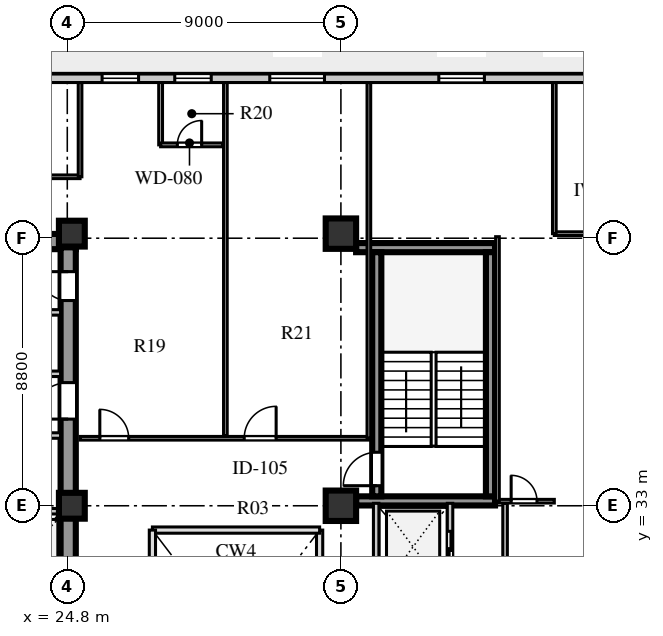
"""IFC4 building model, lengths in metres.
Left out: names, types, materials, properties, quantities, classifications, styles, units other than length and angle.
Written with IfcOpenShell. Run it as: python <this file> out.ifc"""

import sys

from ifc_helpers import new_model, si_unit, direction, frame, frame_2d, origin, origin_2d, place, context, subcontext, project, spatial, rectangle, extrude, element, fill, save


model = new_model("IFC4")
c1 = context("Model", 3, precision=1e-05, world=origin(), true_north=direction((0.0, 1.0)))
c2 = subcontext(c1, "Body", "Model", "MODEL_VIEW")
j1 = project(units=[si_unit("LENGTHUNIT", "METRE"), si_unit("PLANEANGLEUNIT", "RADIAN")], contexts=[c1])
p1 = place(None, origin())
s1 = spatial("IfcSite", under=j1, at=p1, CompositionType="ELEMENT")
p2 = place(p1, origin())
s2 = spatial("IfcBuilding", under=s1, at=p2, CompositionType="ELEMENT")
p3 = place(p2, frame((0.0, 0.0, 104.0)))
s3 = spatial("IfcBuildingStorey", under=s2, at=p3, CompositionType="ELEMENT", Elevation=104.0)
p4 = place(p3, frame((15.4, 41.69, 0.0), z_axis=(0.0, 0.0, 1.0), x_axis=(1.0, 0.0, 0.0)))
e1 = element("IfcWall", 1, at=p4, inside=s3, PredefinedType="SHEAR", context=c2, shape_type="SweptSolid", body=[
    extrude(rectangle(XDim=9.68, YDim=0.5, at=frame_2d((4.84, 0.0))), origin(), (0.0, 0.0, 1.0), 3.6),
])
p5 = place(p3, frame((24.83, 15.74, 0.0), z_axis=(0.0, 0.0, 1.0), x_axis=(0.0, 1.0, 0.0)))
e2 = element("IfcWall", 2, at=p5, inside=s3, PredefinedType="SHEAR", context=c2, shape_type="SweptSolid", body=[
    extrude(rectangle(XDim=25.76, YDim=0.5, at=frame_2d((12.88, 0.0))), origin(), (0.0, 0.0, 1.0), 3.6),
])
p6 = place(p5, frame((1.61, 0.0, 0.0)))
e3 = element("IfcOpeningElement", 3, at=p6, cuts=e2, PredefinedType="OPENING", context=c2, shape_type="SweptSolid", body=[
    extrude(rectangle(XDim=1.2, YDim=2.1, at=frame_2d((0.6, 1.05))), frame((0.0, 0.26, 0.0), z_axis=(0.0, -1.0, 0.0), x_axis=(1.0, 0.0, 0.0)), (0.0, 0.0, 1.0), 0.52),
])
p7 = place(p5, frame((6.78, 0.0, 0.0)))
e4 = element("IfcOpeningElement", 4, at=p7, cuts=e2, PredefinedType="OPENING", context=c2, shape_type="SweptSolid", body=[
    extrude(rectangle(XDim=0.85, YDim=2.06, at=frame_2d((0.425, 1.03))), frame((0.0, 0.26, 0.0), z_axis=(0.0, -1.0, 0.0), x_axis=(1.0, 0.0, 0.0)), (0.0, 0.0, 1.0), 0.52),
])
p8 = place(p5, frame((12.11, 0.0, 0.0)))
e5 = element("IfcOpeningElement", 5, at=p8, cuts=e2, PredefinedType="OPENING", context=c2, shape_type="SweptSolid", body=[
    extrude(rectangle(XDim=1.5, YDim=2.12, at=frame_2d((0.75, 1.06))), frame((0.0, 0.26, 0.0), z_axis=(0.0, -1.0, 0.0), x_axis=(1.0, 0.0, 0.0)), (0.0, 0.0, 1.0), 0.52),
])
p9 = place(p5, frame((20.11, 0.0, 0.0)))
e6 = element("IfcOpeningElement", 6, at=p9, cuts=e2, PredefinedType="OPENING", context=c2, shape_type="SweptSolid", body=[
    extrude(rectangle(XDim=1.2, YDim=2.12, at=frame_2d((0.6, 1.06))), frame((0.0, 0.26, 0.0), z_axis=(0.0, -1.0, 0.0), x_axis=(1.0, 0.0, 0.0)), (0.0, 0.0, 1.0), 0.52),
])
p10 = place(p5, frame((24.01, 0.0, 0.0)))
e7 = element("IfcOpeningElement", 7, at=p10, cuts=e2, PredefinedType="OPENING", context=c2, shape_type="SweptSolid", body=[
    extrude(rectangle(XDim=0.95, YDim=2.1, at=frame_2d((0.475, 1.05))), frame((0.0, 0.26, 0.0), z_axis=(0.0, -1.0, 0.0), x_axis=(1.0, 0.0, 0.0)), (0.0, 0.0, 1.0), 0.52),
])
for number, where, z_axis, x_axis in (
    (8, (34.3, 33.16, 0.0), (0.0, 0.0, 1.0), (1.0, 0.0, 0.0)),
    (9, (34.3, 41.49, 0.0), (0.0, 0.0, 1.0), (1.0, 0.0, 0.0)),
):
    element("IfcWall", number, at=place(p3, frame(where, z_axis=z_axis, x_axis=x_axis)), inside=s3, PredefinedType="SHEAR", context=c2, shape_type="SweptSolid", body=[
        extrude(rectangle(XDim=4.57, YDim=0.3, at=frame_2d((2.285, 0.0))), origin(), (0.0, 0.0, 1.0), 3.6),
    ])
p11 = place(p3, frame((34.98, 33.31, 0.0), z_axis=(0.0, 0.0, 1.0), x_axis=(0.0, 1.0, 0.0)))
e10 = element("IfcWall", 10, at=p11, inside=s3, PredefinedType="SHEAR", context=c2, shape_type="SweptSolid", body=[
    extrude(rectangle(XDim=8.03, YDim=0.3, at=frame_2d((4.015, 0.0))), origin(), (0.0, 0.0, 1.0), 3.6),
])
p12 = place(p11, frame((0.35, 0.0, 0.0)))
e11 = element("IfcOpeningElement", 11, at=p12, cuts=e10, PredefinedType="OPENING", context=c2, shape_type="SweptSolid", body=[
    extrude(rectangle(XDim=1.1, YDim=2.1, at=frame_2d((0.55, 1.05))), frame((0.0, 0.16, 0.0), z_axis=(0.0, -1.0, 0.0), x_axis=(1.0, 0.0, 0.0)), (0.0, 0.0, 1.0), 0.32),
])
p13 = place(p3, frame((38.72, 33.31, 0.0), z_axis=(0.0, 0.0, 1.0), x_axis=(0.0, 1.0, 0.0)))
e12 = element("IfcWall", 12, at=p13, inside=s3, PredefinedType="SHEAR", context=c2, shape_type="SweptSolid", body=[
    extrude(rectangle(XDim=8.03, YDim=0.3, at=frame_2d((4.015, 0.0))), origin(), (0.0, 0.0, 1.0), 3.6),
])
for number, where, z_axis, x_axis in (
    (13, (24.95, 33.0, 0.0), (0.0, 0.0, 1.0), (1.0, 0.0, 0.0)),
    (14, (24.95, 41.95, 0.0), (0.0, 0.0, 1.0), (1.0, 0.0, 0.0)),
):
    element("IfcColumn", number, at=place(p3, frame(where, z_axis=z_axis, x_axis=x_axis)), inside=s3, PredefinedType="COLUMN", context=c2, shape_type="SweptSolid", body=[
        extrude(rectangle(XDim=0.85, YDim=0.85, at=origin_2d()), origin(), (0.0, 0.0, 1.0), 3.6),
    ])
for number, where, z_axis, x_axis in (
    (15, (33.8, 33.0, 0.0), (0.0, 0.0, 1.0), (1.0, 0.0, 0.0)),
    (16, (33.8, 41.95, 0.0), (0.0, 0.0, 1.0), (1.0, 0.0, 0.0)),
):
    element("IfcColumn", number, at=place(p3, frame(where, z_axis=z_axis, x_axis=x_axis)), inside=s3, PredefinedType="COLUMN", context=c2, shape_type="SweptSolid", body=[
        extrude(rectangle(XDim=1.0, YDim=1.0, at=origin_2d()), origin(), (0.0, 0.0, 1.0), 3.6),
    ])
p14 = place(p3, frame((45.35, 47.06, 0.0), z_axis=(0.0, 0.0, 1.0), x_axis=(-1.0, 0.0, 0.0)))
e17 = element("IfcWall", 17, at=p14, inside=s3, PredefinedType="STANDARD", context=c2, shape_type="SweptSolid", body=[
    extrude(rectangle(XDim=32.1, YDim=0.28, at=frame_2d((16.05, 0.0))), origin(), (0.0, 0.0, 1.0), 3.6),
])
p15 = place(p14, frame((30.15, 0.0, 0.0)))
e18 = element("IfcOpeningElement", 18, at=p15, cuts=e17, PredefinedType="OPENING", context=c2, shape_type="SweptSolid", body=[
    extrude(rectangle(XDim=1.0, YDim=2.05, at=frame_2d((0.5, 1.025))), frame((0.0, 0.15, 0.0), z_axis=(0.0, -1.0, 0.0), x_axis=(1.0, 0.0, 0.0)), (0.0, 0.0, 1.0), 0.3),
])
p16 = place(p14, frame((24.345, 0.0, 0.8)))
e19 = element("IfcOpeningElement", 19, at=p16, cuts=e17, PredefinedType="OPENING", context=c2, shape_type="SweptSolid", body=[
    extrude(rectangle(XDim=1.65, YDim=1.95, at=frame_2d((0.825, 0.975))), frame((0.0, 0.15, 0.0), z_axis=(0.0, -1.0, 0.0), x_axis=(1.0, 0.0, 0.0)), (0.0, 0.0, 1.0), 0.3),
])
p17 = place(p14, frame((18.205, 0.0, 0.8)))
e20 = element("IfcOpeningElement", 20, at=p17, cuts=e17, PredefinedType="OPENING", context=c2, shape_type="SweptSolid", body=[
    extrude(rectangle(XDim=1.2, YDim=1.75, at=frame_2d((0.6, 0.875))), frame((0.0, 0.15, 0.0), z_axis=(0.0, -1.0, 0.0), x_axis=(1.0, 0.0, 0.0)), (0.0, 0.0, 1.0), 0.3),
])
p18 = place(p14, frame((15.815, 0.0, 0.8)))
e21 = element("IfcOpeningElement", 21, at=p18, cuts=e17, PredefinedType="OPENING", context=c2, shape_type="SweptSolid", body=[
    extrude(rectangle(XDim=1.2, YDim=1.75, at=frame_2d((0.6, 0.875))), frame((0.0, 0.15, 0.0), z_axis=(0.0, -1.0, 0.0), x_axis=(1.0, 0.0, 0.0)), (0.0, 0.0, 1.0), 0.3),
])
p19 = place(p14, frame((12.09, 0.0, 0.8)))
e22 = element("IfcOpeningElement", 22, at=p19, cuts=e17, PredefinedType="OPENING", context=c2, shape_type="SweptSolid", body=[
    extrude(rectangle(XDim=1.8, YDim=2.0, at=frame_2d((0.9, 1.0))), frame((0.0, 0.15, 0.0), z_axis=(0.0, -1.0, 0.0), x_axis=(1.0, 0.0, 0.0)), (0.0, 0.0, 1.0), 0.3),
])
p20 = place(p14, frame((6.83, 0.0, 0.8)))
e23 = element("IfcOpeningElement", 23, at=p20, cuts=e17, PredefinedType="OPENING", context=c2, shape_type="SweptSolid", body=[
    extrude(rectangle(XDim=1.5, YDim=2.0, at=frame_2d((0.75, 1.0))), frame((0.0, 0.15, 0.0), z_axis=(0.0, -1.0, 0.0), x_axis=(1.0, 0.0, 0.0)), (0.0, 0.0, 1.0), 0.3),
])
p21 = place(p14, frame((1.72, 0.0, 0.8)))
e24 = element("IfcOpeningElement", 24, at=p21, cuts=e17, PredefinedType="OPENING", context=c2, shape_type="SweptSolid", body=[
    extrude(rectangle(XDim=1.2, YDim=1.75, at=frame_2d((0.6, 0.875))), frame((0.0, 0.15, 0.0), z_axis=(0.0, -1.0, 0.0), x_axis=(1.0, 0.0, 0.0)), (0.0, 0.0, 1.0), 0.3),
])
p22 = place(p3, frame((15.9, 32.82, 0.0), z_axis=(0.0, 0.0, 1.0), x_axis=(1.0, 0.0, 0.0)))
e25 = element("IfcWall", 25, at=p22, inside=s3, PredefinedType="SOLIDWALL", context=c2, shape_type="SweptSolid", body=[
    extrude(rectangle(XDim=8.68, YDim=0.18, at=frame_2d((4.34, 0.0))), origin(), (0.0, 0.0, 1.0), 2.95),
])
p23 = place(p3, frame((22.02, 35.31, 0.0), z_axis=(0.0, 0.0, 1.0), x_axis=(1.0, 0.0, 0.0)))
e26 = element("IfcWall", 26, at=p23, inside=s3, PredefinedType="SOLIDWALL", context=c2, shape_type="SweptSolid", body=[
    extrude(rectangle(XDim=2.56, YDim=0.18, at=frame_2d((1.28, 0.0))), origin(), (0.0, 0.0, 1.0), 3.6),
])
p24 = place(p23, frame((0.55, 0.0, 0.0)))
e27 = element("IfcOpeningElement", 27, at=p24, cuts=e26, PredefinedType="OPENING", context=c2, shape_type="SweptSolid", body=[
    extrude(rectangle(XDim=1.0, YDim=2.1, at=frame_2d((0.5, 1.05))), frame((0.0, 0.1, 0.0), z_axis=(0.0, -1.0, 0.0), x_axis=(1.0, 0.0, 0.0)), (0.0, 0.0, 1.0), 0.2),
])
p25 = place(p3, frame((19.64, 37.34, 0.0), z_axis=(0.0, 0.0, 1.0), x_axis=(1.0, 0.0, 0.0)))
e28 = element("IfcWall", 28, at=p25, inside=s3, PredefinedType="SOLIDWALL", context=c2, shape_type="SweptSolid", body=[
    extrude(rectangle(XDim=4.94, YDim=0.18, at=frame_2d((2.47, 0.0))), origin(), (0.0, 0.0, 1.0), 3.6),
])
p26 = place(p25, frame((0.45, 0.0, 0.0)))
e29 = element("IfcOpeningElement", 29, at=p26, cuts=e28, PredefinedType="OPENING", context=c2, shape_type="SweptSolid", body=[
    extrude(rectangle(XDim=1.0, YDim=2.1, at=frame_2d((0.5, 1.05))), frame((0.0, 0.1, 0.0), z_axis=(0.0, -1.0, 0.0), x_axis=(1.0, 0.0, 0.0)), (0.0, 0.0, 1.0), 0.2),
])
p27 = place(p25, frame((2.5, 0.0, 0.0)))
e30 = element("IfcOpeningElement", 30, at=p27, cuts=e28, PredefinedType="OPENING", context=c2, shape_type="SweptSolid", body=[
    extrude(rectangle(XDim=1.0, YDim=2.1, at=frame_2d((0.5, 1.05))), frame((0.0, 0.1, 0.0), z_axis=(0.0, -1.0, 0.0), x_axis=(1.0, 0.0, 0.0)), (0.0, 0.0, 1.0), 0.2),
])
p28 = place(p3, frame((19.64, 39.36, 0.0), z_axis=(0.0, 0.0, 1.0), x_axis=(1.0, 0.0, 0.0)))
e31 = element("IfcWall", 31, at=p28, inside=s3, PredefinedType="SOLIDWALL", context=c2, shape_type="SweptSolid", body=[
    extrude(rectangle(XDim=4.94, YDim=0.18, at=frame_2d((2.47, 0.0))), origin(), (0.0, 0.0, 1.0), 3.6),
])
p29 = place(p3, frame((34.96, 28.86, 0.0), z_axis=(0.0, 0.0, 1.0), x_axis=(0.0, 1.0, 0.0)))
e32 = element("IfcWall", 32, at=p29, inside=s3, PredefinedType="SOLIDWALL", context=c2, shape_type="SweptSolid", body=[
    extrude(rectangle(XDim=4.22, YDim=0.18, at=frame_2d((2.11, 0.0))), origin(), (0.0, 0.0, 1.0), 3.6),
])
p30 = place(p3, frame((37.39, 28.86, 0.0), z_axis=(0.0, 0.0, 1.0), x_axis=(0.0, 1.0, 0.0)))
e33 = element("IfcWall", 33, at=p30, inside=s3, PredefinedType="SOLIDWALL", context=c2, shape_type="SweptSolid", body=[
    extrude(rectangle(XDim=4.22, YDim=0.18, at=frame_2d((2.11, 0.0))), origin(), (0.0, 0.0, 1.0), 3.6),
])
p31 = place(p30, frame((2.1, 0.0, 0.0)))
e34 = element("IfcOpeningElement", 34, at=p31, cuts=e33, PredefinedType="OPENING", context=c2, shape_type="SweptSolid", body=[
    extrude(rectangle(XDim=1.2, YDim=2.12, at=frame_2d((0.6, 1.06))), frame((0.0, 0.1, 0.0), z_axis=(0.0, -1.0, 0.0), x_axis=(1.0, 0.0, 0.0)), (0.0, 0.0, 1.0), 0.2),
])
p32 = place(p3, frame((39.2, 28.86, 0.0), z_axis=(0.0, 0.0, 1.0), x_axis=(0.0, 1.0, 0.0)))
e35 = element("IfcWall", 35, at=p32, inside=s3, PredefinedType="PARTITIONING", context=c2, shape_type="SweptSolid", body=[
    extrude(rectangle(XDim=4.22, YDim=0.15, at=frame_2d((2.11, 0.0))), origin(), (0.0, 0.0, 1.0), 3.6),
])
p33 = place(p3, frame((25.22, 35.22, 0.0), z_axis=(0.0, 0.0, 1.0), x_axis=(1.0, 0.0, 0.0)))
e36 = element("IfcWall", 36, at=p33, inside=s3, PredefinedType="PARTITIONING", context=c2, shape_type="SweptSolid", body=[
    extrude(rectangle(XDim=9.5, YDim=0.12, at=frame_2d((4.75, 0.0))), origin(), (0.0, 0.0, 1.0), 3.6),
])
p34 = place(p33, frame((0.65, 0.0, 0.0)))
e37 = element("IfcOpeningElement", 37, at=p34, cuts=e36, PredefinedType="OPENING", context=c2, shape_type="SweptSolid", body=[
    extrude(rectangle(XDim=0.95, YDim=2.1, at=frame_2d((0.475, 1.05))), frame((0.0, 0.07, 0.0), z_axis=(0.0, -1.0, 0.0), x_axis=(1.0, 0.0, 0.0)), (0.0, 0.0, 1.0), 0.14),
])
p35 = place(p33, frame((5.4, 0.0, 0.0)))
e38 = element("IfcOpeningElement", 38, at=p35, cuts=e36, PredefinedType="OPENING", context=c2, shape_type="SweptSolid", body=[
    extrude(rectangle(XDim=1.05, YDim=2.1, at=frame_2d((0.525, 1.05))), frame((0.0, 0.07, 0.0), z_axis=(0.0, -1.0, 0.0), x_axis=(1.0, 0.0, 0.0)), (0.0, 0.0, 1.0), 0.14),
])
p36 = place(p3, frame((40.82, 41.95, 0.0), z_axis=(0.0, 0.0, 1.0), x_axis=(1.0, 0.0, 0.0)))
e39 = element("IfcWall", 39, at=p36, inside=s3, PredefinedType="PARTITIONING", context=c2, shape_type="SweptSolid", body=[
    extrude(rectangle(XDim=7.3, YDim=0.12, at=frame_2d((3.65, 0.0))), origin(), (0.0, 0.0, 1.0), 2.95),
])
p37 = place(p3, frame((13.59, 43.82, 0.0), z_axis=(0.0, 0.0, 1.0), x_axis=(1.0, 0.0, 0.0)))
e40 = element("IfcWall", 40, at=p37, inside=s3, PredefinedType="PARTITIONING", context=c2, shape_type="SweptSolid", body=[
    extrude(rectangle(XDim=11.63, YDim=0.12, at=frame_2d((5.815, 0.0))), origin(), (0.0, 0.0, 1.0), 3.6),
])
p38 = place(p37, frame((4.56, 0.0, 0.0)))
e41 = element("IfcOpeningElement", 41, at=p38, cuts=e40, PredefinedType="OPENING", context=c2, shape_type="SweptSolid", body=[
    extrude(rectangle(XDim=1.0, YDim=2.08, at=frame_2d((0.5, 1.04))), frame((0.0, 0.07, 0.0), z_axis=(0.0, -1.0, 0.0), x_axis=(1.0, 0.0, 0.0)), (0.0, 0.0, 1.0), 0.14),
])
p39 = place(p3, frame((25.22, 43.82, 0.0), z_axis=(0.0, 0.0, 1.0), x_axis=(0.0, 1.0, 0.0)))
e42 = element("IfcWall", 42, at=p39, inside=s3, PredefinedType="PARTITIONING", context=c2, shape_type="SweptSolid", body=[
    extrude(rectangle(XDim=3.1, YDim=0.12, at=frame_2d((1.55, 0.0))), origin(), (0.0, 0.0, 1.0), 3.1),
])
p40 = place(p3, frame((34.72, 35.22, 0.0), z_axis=(0.0, 0.0, 1.0), x_axis=(0.0, 1.0, 0.0)))
e43 = element("IfcWall", 43, at=p40, inside=s3, PredefinedType="PARTITIONING", context=c2, shape_type="SweptSolid", body=[
    extrude(rectangle(XDim=11.7, YDim=0.12, at=frame_2d((5.85, 0.0))), origin(), (0.0, 0.0, 1.0), 3.6),
])
p41 = place(p3, frame((30.0, 35.3, 0.0), z_axis=(0.0, 0.0, 1.0), x_axis=(0.0, 1.0, 0.0)))
e44 = element("IfcWall", 44, at=p41, inside=s3, PredefinedType="PARTITIONING", context=c2, shape_type="SweptSolid", body=[
    extrude(rectangle(XDim=11.62, YDim=0.12, at=frame_2d((5.81, 0.0))), origin(), (0.0, 0.0, 1.0), 3.6),
])
p42 = place(p3, frame((27.87, 44.87, 0.0), z_axis=(0.0, 0.0, 1.0), x_axis=(0.0, 1.0, 0.0)))
e45 = element("IfcWall", 45, at=p42, inside=s3, PredefinedType="PLUMBINGWALL", context=c2, shape_type="SweptSolid", body=[
    extrude(rectangle(XDim=2.05, YDim=0.125, at=frame_2d((1.025, 0.0))), origin(), (0.0, 0.0, 1.0), 3.6),
])
p43 = place(p3, frame((27.87, 44.87, 0.0), z_axis=(0.0, 0.0, 1.0), x_axis=(1.0, 0.0, 0.0)))
e46 = element("IfcWall", 46, at=p43, inside=s3, PredefinedType="PLUMBINGWALL", context=c2, shape_type="SweptSolid", body=[
    extrude(rectangle(XDim=2.05, YDim=0.125, at=frame_2d((1.025, 0.0))), origin(), (0.0, 0.0, 1.0), 3.6),
])
p44 = place(p43, frame((0.55, 0.0, 0.0)))
e47 = element("IfcOpeningElement", 47, at=p44, cuts=e46, PredefinedType="OPENING", context=c2, shape_type="SweptSolid", body=[
    extrude(rectangle(XDim=0.8, YDim=2.05, at=frame_2d((0.4, 1.025))), frame((0.0, 0.073, 0.0), z_axis=(0.0, -1.0, 0.0), x_axis=(1.0, 0.0, 0.0)), (0.0, 0.0, 1.0), 0.145),
])
p45 = place(p3, frame((38.95, 33.15, 0.0), z_axis=(0.0, 0.0, 1.0), x_axis=(1.0, 0.0, 0.0)))
e48 = element("IfcWall", 48, at=p45, inside=s3, PredefinedType="PARTITIONING", context=c2, shape_type="SweptSolid", body=[
    extrude(rectangle(XDim=1.87, YDim=0.12, at=frame_2d((0.935, 0.0))), origin(), (0.0, 0.0, 1.0), 3.6),
])
p46 = place(p45, frame((0.45, 0.0, 0.0)))
e49 = element("IfcOpeningElement", 49, at=p46, cuts=e48, PredefinedType="OPENING", context=c2, shape_type="SweptSolid", body=[
    extrude(rectangle(XDim=0.85, YDim=2.05, at=frame_2d((0.425, 1.025))), frame((0.0, 0.07, 0.0), z_axis=(0.0, -1.0, 0.0), x_axis=(1.0, 0.0, 0.0)), (0.0, 0.0, 1.0), 0.14),
])
p47 = place(p3, frame((38.95, 33.15, 0.0), z_axis=(0.0, 0.0, 1.0), x_axis=(0.0, 1.0, 0.0)))
e50 = element("IfcWall", 50, at=p47, inside=s3, PredefinedType="PARTITIONING", context=c2, shape_type="SweptSolid", body=[
    extrude(rectangle(XDim=8.7, YDim=0.12, at=frame_2d((4.35, 0.0))), origin(), (0.0, 0.0, 1.0), 3.6),
])
p48 = place(p3, frame((40.82, 41.95, 0.0), z_axis=(0.0, 0.0, 1.0), x_axis=(0.0, 1.0, 0.0)))
e51 = element("IfcWall", 51, at=p48, inside=s3, PredefinedType="PARTITIONING", context=c2, shape_type="SweptSolid", body=[
    extrude(rectangle(XDim=4.97, YDim=0.12, at=frame_2d((2.485, 0.0))), origin(), (0.0, 0.0, 1.0), 3.6),
])
p49 = place(p17, origin())
e52 = element("IfcWindow", 52, at=p49, inside=s3, PartitioningType="SINGLE_PANEL", PredefinedType="WINDOW", context=c2, shape_type="SweptSolid", body=[
    extrude(rectangle(XDim=1.2, YDim=1.75, at=frame_2d((0.6, 0.875))), frame((0.0, 0.03, 0.0), z_axis=(0.0, -1.0, 0.0), x_axis=(1.0, 0.0, 0.0)), (0.0, 0.0, 1.0), 0.06),
])
fill(e20, e52)
p50 = place(p18, origin())
e53 = element("IfcWindow", 53, at=p50, inside=s3, PartitioningType="SINGLE_PANEL", PredefinedType="WINDOW", context=c2, shape_type="SweptSolid", body=[
    extrude(rectangle(XDim=1.2, YDim=1.75, at=frame_2d((0.6, 0.875))), frame((0.0, 0.03, 0.0), z_axis=(0.0, -1.0, 0.0), x_axis=(1.0, 0.0, 0.0)), (0.0, 0.0, 1.0), 0.06),
])
fill(e21, e53)
p51 = place(p19, origin())
e54 = element("IfcWindow", 54, at=p51, inside=s3, PartitioningType="SINGLE_PANEL", PredefinedType="WINDOW", context=c2, shape_type="SweptSolid", body=[
    extrude(rectangle(XDim=1.8, YDim=2.0, at=frame_2d((0.9, 1.0))), frame((0.0, 0.03, 0.0), z_axis=(0.0, -1.0, 0.0), x_axis=(1.0, 0.0, 0.0)), (0.0, 0.0, 1.0), 0.06),
])
fill(e22, e54)
p52 = place(p20, origin())
e55 = element("IfcWindow", 55, at=p52, inside=s3, PartitioningType="SINGLE_PANEL", PredefinedType="WINDOW", context=c2, shape_type="SweptSolid", body=[
    extrude(rectangle(XDim=1.5, YDim=2.0, at=frame_2d((0.75, 1.0))), frame((0.0, 0.03, 0.0), z_axis=(0.0, -1.0, 0.0), x_axis=(1.0, 0.0, 0.0)), (0.0, 0.0, 1.0), 0.06),
])
fill(e23, e55)
p53 = place(p9, frame((1.2, 0.0, 0.0), z_axis=(0.0, 0.0, 1.0), x_axis=(-1.0, 0.0, 0.0)))
e56 = element("IfcDoor", 56, at=p53, inside=s3, OperationType="SINGLE_SWING_RIGHT", PredefinedType="DOOR", context=c2, shape_type="SweptSolid", body=[
    extrude(rectangle(XDim=1.2, YDim=2.12, at=frame_2d((0.6, 1.06))), frame((0.0, 0.025, 0.0), z_axis=(0.0, -1.0, 0.0), x_axis=(1.0, 0.0, 0.0)), (0.0, 0.0, 1.0), 0.05),
])
fill(e6, e56)
p54 = place(p10, frame((0.95, 0.0, 0.0), z_axis=(0.0, 0.0, 1.0), x_axis=(-1.0, 0.0, 0.0)))
e57 = element("IfcDoor", 57, at=p54, inside=s3, OperationType="SINGLE_SWING_LEFT", PredefinedType="DOOR", context=c2, shape_type="SweptSolid", body=[
    extrude(rectangle(XDim=0.95, YDim=2.1, at=frame_2d((0.475, 1.05))), frame((0.0, 0.025, 0.0), z_axis=(0.0, -1.0, 0.0), x_axis=(1.0, 0.0, 0.0)), (0.0, 0.0, 1.0), 0.05),
])
fill(e7, e57)
p55 = place(p12, origin())
e58 = element("IfcDoor", 58, at=p55, inside=s3, OperationType="SINGLE_SWING_LEFT", PredefinedType="DOOR", context=c2, shape_type="SweptSolid", body=[
    extrude(rectangle(XDim=1.1, YDim=2.1, at=frame_2d((0.55, 1.05))), frame((0.0, 0.025, 0.0), z_axis=(0.0, -1.0, 0.0), x_axis=(1.0, 0.0, 0.0)), (0.0, 0.0, 1.0), 0.05),
])
fill(e11, e58)
p56 = place(p31, frame((1.2, 0.0, 0.0), z_axis=(0.0, 0.0, 1.0), x_axis=(-1.0, 0.0, 0.0)))
e59 = element("IfcDoor", 59, at=p56, inside=s3, OperationType="DOUBLE_DOOR_SLIDING", PredefinedType="DOOR", context=c2, shape_type="SweptSolid", body=[
    extrude(rectangle(XDim=1.2, YDim=2.12, at=frame_2d((0.6, 1.06))), frame((0.0, 0.025, 0.0), z_axis=(0.0, -1.0, 0.0), x_axis=(1.0, 0.0, 0.0)), (0.0, 0.0, 1.0), 0.05),
])
fill(e34, e59)
p57 = place(p34, origin())
e60 = element("IfcDoor", 60, at=p57, inside=s3, OperationType="SINGLE_SWING_LEFT", PredefinedType="DOOR", context=c2, shape_type="SweptSolid", body=[
    extrude(rectangle(XDim=0.95, YDim=2.1, at=frame_2d((0.475, 1.05))), frame((0.0, 0.025, 0.0), z_axis=(0.0, -1.0, 0.0), x_axis=(1.0, 0.0, 0.0)), (0.0, 0.0, 1.0), 0.05),
])
fill(e37, e60)
p58 = place(p44, frame((0.8, 0.0, 0.0), z_axis=(0.0, 0.0, 1.0), x_axis=(-1.0, 0.0, 0.0)))
e61 = element("IfcDoor", 61, at=p58, inside=s3, OperationType="SINGLE_SWING_LEFT", PredefinedType="DOOR", context=c2, shape_type="SweptSolid", body=[
    extrude(rectangle(XDim=0.8, YDim=2.05, at=frame_2d((0.4, 1.025))), frame((0.0, 0.025, 0.0), z_axis=(0.0, -1.0, 0.0), x_axis=(1.0, 0.0, 0.0)), (0.0, 0.0, 1.0), 0.05),
])
fill(e47, e61)
p59 = place(p35, origin())
e62 = element("IfcDoor", 62, at=p59, inside=s3, OperationType="SINGLE_SWING_RIGHT", PredefinedType="DOOR", context=c2, shape_type="SweptSolid", body=[
    extrude(rectangle(XDim=1.05, YDim=2.1, at=frame_2d((0.525, 1.05))), frame((0.0, 0.025, 0.0), z_axis=(0.0, -1.0, 0.0), x_axis=(1.0, 0.0, 0.0)), (0.0, 0.0, 1.0), 0.05),
])
fill(e38, e62)
p60 = place(p46, origin())
e63 = element("IfcDoor", 63, at=p60, inside=s3, OperationType="SINGLE_SWING_LEFT", PredefinedType="DOOR", context=c2, shape_type="SweptSolid", body=[
    extrude(rectangle(XDim=0.85, YDim=2.05, at=frame_2d((0.425, 1.025))), frame((0.0, 0.025, 0.0), z_axis=(0.0, -1.0, 0.0), x_axis=(1.0, 0.0, 0.0)), (0.0, 0.0, 1.0), 0.05),
])
fill(e49, e63)
save(model, sys.argv[1])
